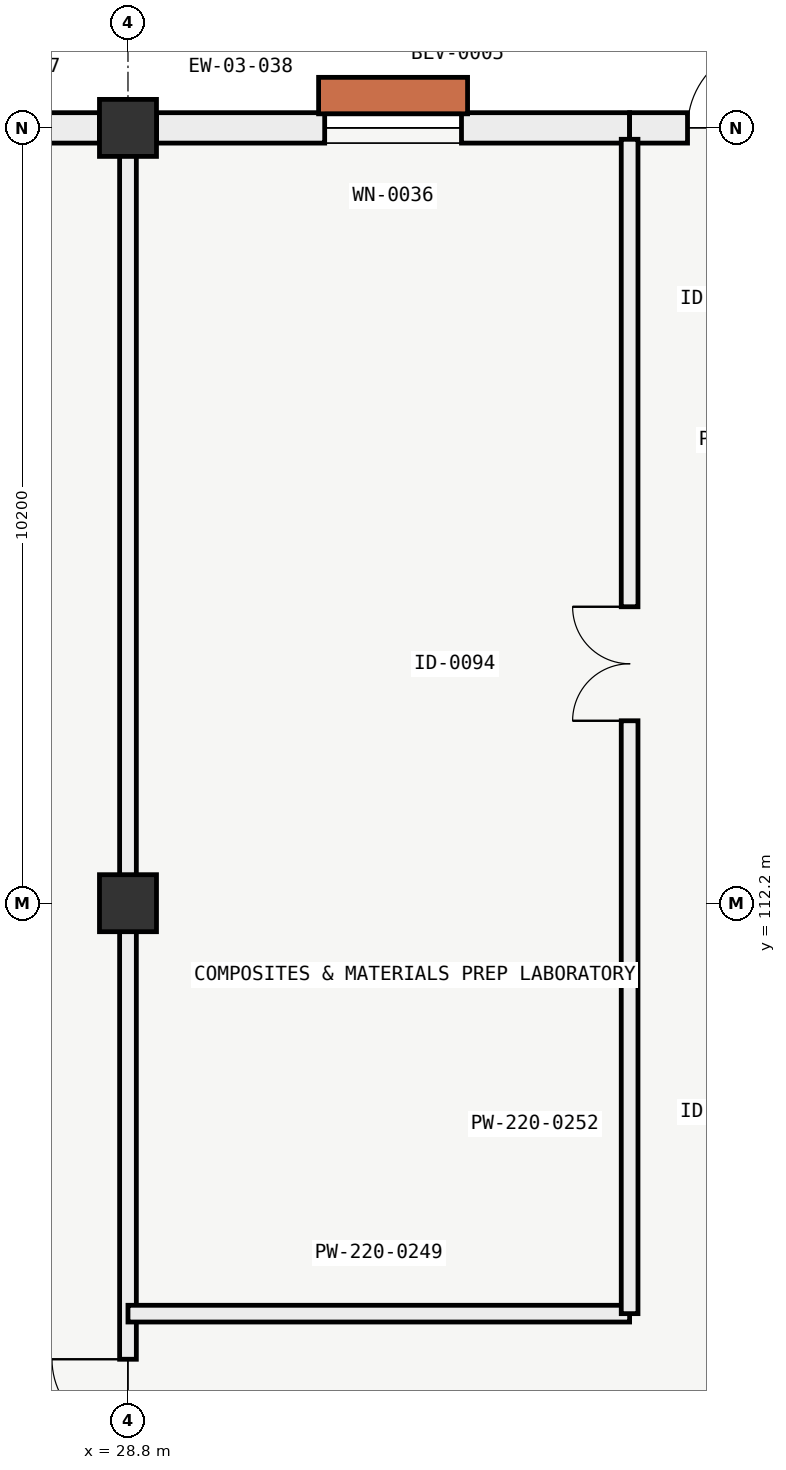
"""IFC4 building model, lengths in metres.
Left out: names, types, materials, properties, quantities, classifications, styles, units other than length and angle.
Written with IfcOpenShell. Run it as: python <this file> out.ifc"""

import sys

from ifc_helpers import new_model, si_unit, direction, frame, frame_2d, origin, origin_2d, place, context, subcontext, project, spatial, rectangle, extrude, element, fill, save


model = new_model("IFC4")
c1 = context("Model", 3, precision=1e-05, world=origin(), true_north=direction((0.0, 1.0)))
c2 = subcontext(c1, "Body", "Model", "MODEL_VIEW")
j1 = project(units=[si_unit("LENGTHUNIT", "METRE"), si_unit("PLANEANGLEUNIT", "RADIAN")], contexts=[c1])
p1 = place(None, origin())
s1 = spatial("IfcSite", under=j1, at=p1, CompositionType="ELEMENT")
p2 = place(p1, origin())
s2 = spatial("IfcBuilding", under=s1, at=p2, CompositionType="ELEMENT")
p3 = place(p2, origin())
s3 = spatial("IfcBuildingStorey", under=s2, at=p3, CompositionType="ELEMENT", Elevation=0.0)
for number, where, z_axis, x_axis in (
    (1, (28.8, 112.2, 0.0), (0.0, 0.0, 1.0), (1.0, 0.0, 0.0)),
    (2, (28.8, 122.4, 0.0), (0.0, 0.0, 1.0), (1.0, 0.0, 0.0)),
):
    element("IfcColumn", number, at=place(p3, frame(where, z_axis=z_axis, x_axis=x_axis)), inside=s3, PredefinedType="COLUMN", context=c2, shape_type="SweptSolid", body=[
        extrude(rectangle(XDim=0.75, YDim=0.75, at=origin_2d()), origin(), (0.0, 0.0, 1.0), 5.4),
    ])
p4 = place(p3, frame((19.2, 122.4, 0.0), z_axis=(0.0, 0.0, 1.0), x_axis=(1.0, 0.0, 0.0)))
e3 = element("IfcWall", 3, at=p4, inside=s3, PredefinedType="SOLIDWALL", context=c2, shape_type="SweptSolid", body=[
    extrude(rectangle(XDim=9.224, YDim=0.4, at=frame_2d((4.612, 0.0))), origin(), (0.0, 0.0, 1.0), 3.7),
])
p5 = place(p4, frame((1.2, 0.0, 0.55)))
e4 = element("IfcOpeningElement", 4, at=p5, cuts=e3, PredefinedType="OPENING", context=c2, shape_type="SweptSolid", body=[
    extrude(rectangle(XDim=2.0, YDim=1.35, at=frame_2d((1.0, 0.675))), frame((0.0, 0.21, 0.0), z_axis=(0.0, -1.0, 0.0), x_axis=(1.0, 0.0, 0.0)), (0.0, 0.0, 1.0), 0.42),
])
p6 = place(p4, frame((4.8, 0.0, 0.55)))
e5 = element("IfcOpeningElement", 5, at=p6, cuts=e3, PredefinedType="OPENING", context=c2, shape_type="SweptSolid", body=[
    extrude(rectangle(XDim=2.0, YDim=1.35, at=frame_2d((1.0, 0.675))), frame((0.0, 0.21, 0.0), z_axis=(0.0, -1.0, 0.0), x_axis=(1.0, 0.0, 0.0)), (0.0, 0.0, 1.0), 0.42),
])
p7 = place(p3, frame((29.176, 122.4, 0.0), z_axis=(0.0, 0.0, 1.0), x_axis=(1.0, 0.0, 0.0)))
e6 = element("IfcWall", 6, at=p7, inside=s3, PredefinedType="SOLIDWALL", context=c2, shape_type="SweptSolid", body=[
    extrude(rectangle(XDim=6.224, YDim=0.4, at=frame_2d((3.112, 0.0))), origin(), (0.0, 0.0, 1.0), 4.493),
])
p8 = place(p7, frame((2.212, 0.0, 0.9)))
e7 = element("IfcOpeningElement", 7, at=p8, cuts=e6, PredefinedType="OPENING", context=c2, shape_type="SweptSolid", body=[
    extrude(rectangle(XDim=1.8, YDim=2.1, at=frame_2d((0.9, 1.05))), frame((0.0, 0.21, 0.0), z_axis=(0.0, -1.0, 0.0), x_axis=(1.0, 0.0, 0.0)), (0.0, 0.0, 1.0), 0.42),
])
p9 = place(p3, frame((35.4, 122.4, 0.0), z_axis=(0.0, 0.0, 1.0), x_axis=(1.0, 0.0, 0.0)))
e8 = element("IfcWall", 8, at=p9, inside=s3, PredefinedType="SOLIDWALL", context=c2, shape_type="SweptSolid", body=[
    extrude(rectangle(XDim=2.624, YDim=0.4, at=frame_2d((1.312, 0.0))), origin(), (0.0, 0.0, 1.0), 4.493),
])
p10 = place(p9, frame((0.762, 0.0, 0.0)))
e9 = element("IfcOpeningElement", 9, at=p10, cuts=e8, PredefinedType="OPENING", context=c2, shape_type="SweptSolid", body=[
    extrude(rectangle(XDim=1.1, YDim=2.2, at=frame_2d((0.55, 1.1))), frame((0.0, 0.21, 0.0), z_axis=(0.0, -1.0, 0.0), x_axis=(1.0, 0.0, 0.0)), (0.0, 0.0, 1.0), 0.42),
])
p11 = place(p3, frame((28.8, 51.15, 0.0), z_axis=(0.0, 0.0, 1.0), x_axis=(0.0, 1.0, 0.0)))
e10 = element("IfcWall", 10, at=p11, inside=s3, PredefinedType="PARTITIONING", context=c2, shape_type="SweptSolid", body=[
    extrude(rectangle(XDim=71.1, YDim=0.22, at=frame_2d((35.55, 0.0))), origin(), (0.0, 0.0, 1.0), 3.94),
])
p12 = place(p11, frame((16.25, 0.0, 0.0)))
e11 = element("IfcOpeningElement", 11, at=p12, cuts=e10, PredefinedType="OPENING", context=c2, shape_type="SweptSolid", body=[
    extrude(rectangle(XDim=2.0, YDim=2.4, at=frame_2d((1.0, 1.2))), frame((0.0, 0.12, 0.0), z_axis=(0.0, -1.0, 0.0), x_axis=(1.0, 0.0, 0.0)), (0.0, 0.0, 1.0), 0.24),
])
p13 = place(p11, frame((53.05, 0.0, 0.0)))
e12 = element("IfcOpeningElement", 12, at=p13, cuts=e10, PredefinedType="OPENING", context=c2, shape_type="SweptSolid", body=[
    extrude(rectangle(XDim=2.0, YDim=2.4, at=frame_2d((1.0, 1.2))), frame((0.0, 0.12, 0.0), z_axis=(0.0, -1.0, 0.0), x_axis=(1.0, 0.0, 0.0)), (0.0, 0.0, 1.0), 0.24),
])
p14 = place(p3, frame((28.8, 106.8, 0.0), z_axis=(0.0, 0.0, 1.0), x_axis=(1.0, 0.0, 0.0)))
e13 = element("IfcWall", 13, at=p14, inside=s3, PredefinedType="PARTITIONING", context=c2, shape_type="SweptSolid", body=[
    extrude(rectangle(XDim=6.6, YDim=0.22, at=frame_2d((3.3, 0.0))), origin(), (0.0, 0.0, 1.0), 4.643),
])
p15 = place(p3, frame((35.4, 106.8, 0.0), z_axis=(0.0, 0.0, 1.0), x_axis=(0.0, 1.0, 0.0)))
e14 = element("IfcWall", 14, at=p15, inside=s3, PredefinedType="PARTITIONING", context=c2, shape_type="SweptSolid", body=[
    extrude(rectangle(XDim=15.45, YDim=0.22, at=frame_2d((7.725, 0.0))), origin(), (0.0, 0.0, 1.0), 4.493),
])
p16 = place(p15, frame((7.8, 0.0, 0.0)))
e15 = element("IfcOpeningElement", 15, at=p16, cuts=e14, PredefinedType="OPENING", context=c2, shape_type="SweptSolid", body=[
    extrude(rectangle(XDim=1.5, YDim=2.2, at=frame_2d((0.75, 1.1))), frame((0.0, 0.12, 0.0), z_axis=(0.0, -1.0, 0.0), x_axis=(1.0, 0.0, 0.0)), (0.0, 0.0, 1.0), 0.24),
])
p17 = place(p8, origin())
e16 = element("IfcWindow", 16, at=p17, inside=s3, PartitioningType="SINGLE_PANEL", PredefinedType="WINDOW", context=c2, shape_type="SweptSolid", body=[
    extrude(rectangle(XDim=1.8, YDim=2.1, at=frame_2d((0.9, 1.05))), frame((0.0, 0.03, 0.0), z_axis=(0.0, -1.0, 0.0), x_axis=(1.0, 0.0, 0.0)), (0.0, 0.0, 1.0), 0.06),
])
fill(e7, e16)
p18 = place(p10, origin())
e17 = element("IfcDoor", 17, at=p18, inside=s3, OperationType="SINGLE_SWING_RIGHT", PredefinedType="DOOR", context=c2, shape_type="SweptSolid", body=[
    extrude(rectangle(XDim=1.1, YDim=2.2, at=frame_2d((0.55, 1.1))), frame((0.0, 0.025, 0.0), z_axis=(0.0, -1.0, 0.0), x_axis=(1.0, 0.0, 0.0)), (0.0, 0.0, 1.0), 0.05),
])
fill(e9, e17)
p19 = place(p13, origin())
e18 = element("IfcDoor", 18, at=p19, inside=s3, OperationType="DOUBLE_DOOR_SINGLE_SWING", PredefinedType="DOOR", context=c2, shape_type="SweptSolid", body=[
    extrude(rectangle(XDim=2.0, YDim=2.4, at=frame_2d((1.0, 1.2))), frame((0.0, 0.025, 0.0), z_axis=(0.0, -1.0, 0.0), x_axis=(1.0, 0.0, 0.0)), (0.0, 0.0, 1.0), 0.05),
])
fill(e12, e18)
p20 = place(p16, origin())
e19 = element("IfcDoor", 19, at=p20, inside=s3, OperationType="DOUBLE_DOOR_SINGLE_SWING", PredefinedType="DOOR", context=c2, shape_type="SweptSolid", body=[
    extrude(rectangle(XDim=1.5, YDim=2.2, at=frame_2d((0.75, 1.1))), frame((0.0, 0.025, 0.0), z_axis=(0.0, -1.0, 0.0), x_axis=(1.0, 0.0, 0.0)), (0.0, 0.0, 1.0), 0.05),
])
fill(e15, e19)
save(model, sys.argv[1])
